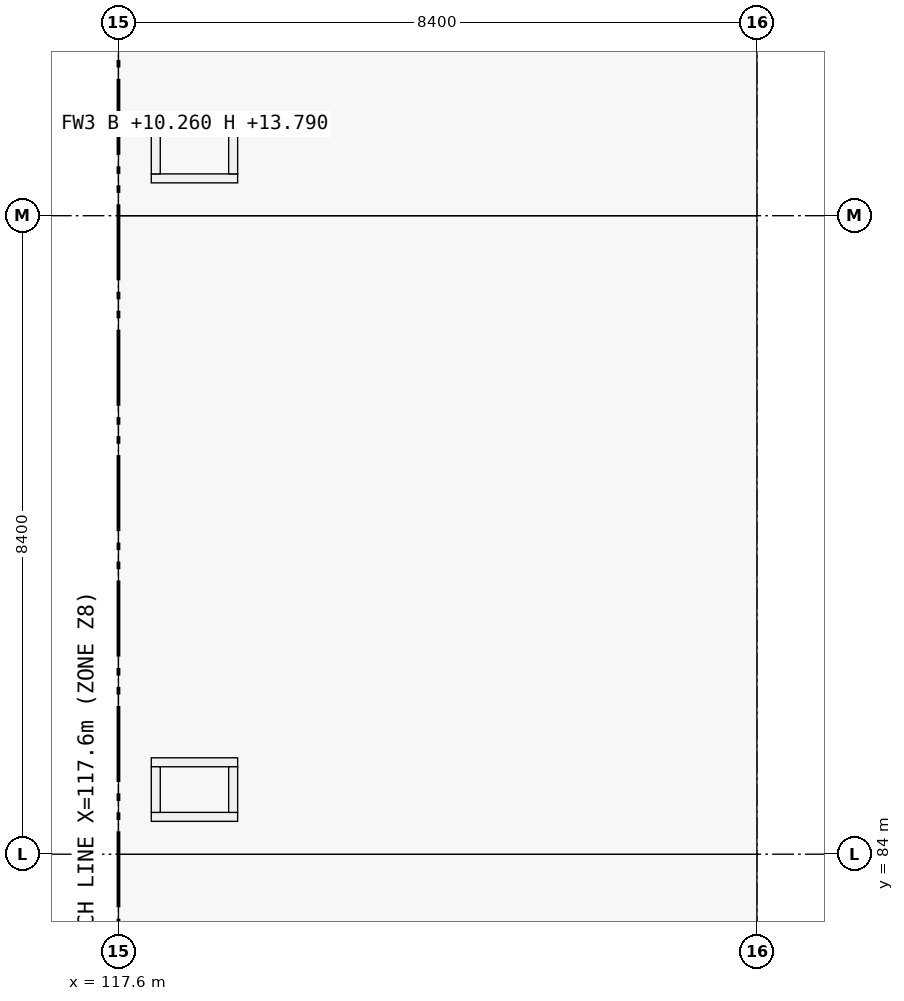
"""IFC4 building model, lengths in metres.
Left out: names, types, materials, properties, quantities, classifications, styles, units other than length and angle.
Written with IfcOpenShell. Run it as: python <this file> out.ifc"""

import sys

from ifc_helpers import new_model, si_unit, direction, frame, frame_2d, origin, origin_2d, place, context, subcontext, project, spatial, rectangle, extrude, element, save


model = new_model("IFC4")
c1 = context("Model", 3, precision=1e-05, world=origin(), true_north=direction((0.0, 1.0)))
c2 = subcontext(c1, "Body", "Model", "MODEL_VIEW")
j1 = project(units=[si_unit("LENGTHUNIT", "METRE"), si_unit("PLANEANGLEUNIT", "RADIAN")], contexts=[c1])
p1 = place(None, origin())
s1 = spatial("IfcSite", under=j1, at=p1, CompositionType="ELEMENT")
p2 = place(p1, origin())
s2 = spatial("IfcBuilding", under=s1, at=p2, CompositionType="ELEMENT")
p3 = place(p2, frame((0.0, 0.0, 10.26)))
s3 = spatial("IfcBuildingStorey", under=s2, at=p3, CompositionType="ELEMENT", Elevation=10.26)
for number, where, z_axis, x_axis in (
    (1, (117.6, 84.0, 0.0), (0.0, 0.0, 1.0), (1.0, 0.0, 0.0)),
    (2, (117.6, 92.4, 0.0), (0.0, 0.0, 1.0), (1.0, 0.0, 0.0)),
    (3, (126.0, 84.0, 0.0), (0.0, 0.0, 1.0), (1.0, 0.0, 0.0)),
    (4, (126.0, 92.4, 0.0), (0.0, 0.0, 1.0), (1.0, 0.0, 0.0)),
):
    element("IfcColumn", number, at=place(p3, frame(where, z_axis=z_axis, x_axis=x_axis)), inside=s3, PredefinedType="COLUMN", context=c2, shape_type="SweptSolid", body=[
        extrude(rectangle(XDim=0.55, YDim=0.55, at=origin_2d()), origin(), (0.0, 0.0, 1.0), 4.25),
    ])
for number, where, z_axis, x_axis in (
    (5, (118.032, 84.491, 0.0), (0.0, 0.0, 1.0), (1.0, 0.0, 0.0)),
    (6, (118.032, 85.209, 0.0), (0.0, 0.0, 1.0), (1.0, 0.0, 0.0)),
):
    element("IfcWall", number, at=place(p3, frame(where, z_axis=z_axis, x_axis=x_axis)), inside=s3, PredefinedType="PARTITIONING", context=c2, shape_type="SweptSolid", body=[
        extrude(rectangle(XDim=1.136, YDim=0.118, at=frame_2d((0.568, 0.0))), origin(), (0.0, 0.0, 1.0), 3.53),
    ])
for number, where, z_axis, x_axis in (
    (7, (118.091, 84.55, 0.0), (0.0, 0.0, 1.0), (0.0, 1.0, 0.0)),
    (8, (119.109, 84.55, 0.0), (0.0, 0.0, 1.0), (0.0, 1.0, 0.0)),
):
    element("IfcWall", number, at=place(p3, frame(where, z_axis=z_axis, x_axis=x_axis)), inside=s3, PredefinedType="PARTITIONING", context=c2, shape_type="SweptSolid", body=[
        extrude(rectangle(XDim=0.6, YDim=0.118, at=frame_2d((0.3, 0.0))), origin(), (0.0, 0.0, 1.0), 3.53),
    ])
for number, where, z_axis, x_axis in (
    (9, (118.032, 92.891, 0.0), (0.0, 0.0, 1.0), (1.0, 0.0, 0.0)),
    (10, (118.032, 93.609, 0.0), (0.0, 0.0, 1.0), (1.0, 0.0, 0.0)),
):
    element("IfcWall", number, at=place(p3, frame(where, z_axis=z_axis, x_axis=x_axis)), inside=s3, PredefinedType="PARTITIONING", context=c2, shape_type="SweptSolid", body=[
        extrude(rectangle(XDim=1.136, YDim=0.118, at=frame_2d((0.568, 0.0))), origin(), (0.0, 0.0, 1.0), 3.53),
    ])
for number, where, z_axis, x_axis in (
    (11, (118.091, 92.95, 0.0), (0.0, 0.0, 1.0), (0.0, 1.0, 0.0)),
    (12, (119.109, 92.95, 0.0), (0.0, 0.0, 1.0), (0.0, 1.0, 0.0)),
):
    element("IfcWall", number, at=place(p3, frame(where, z_axis=z_axis, x_axis=x_axis)), inside=s3, PredefinedType="PARTITIONING", context=c2, shape_type="SweptSolid", body=[
        extrude(rectangle(XDim=0.6, YDim=0.118, at=frame_2d((0.3, 0.0))), origin(), (0.0, 0.0, 1.0), 3.53),
    ])
save(model, sys.argv[1])
